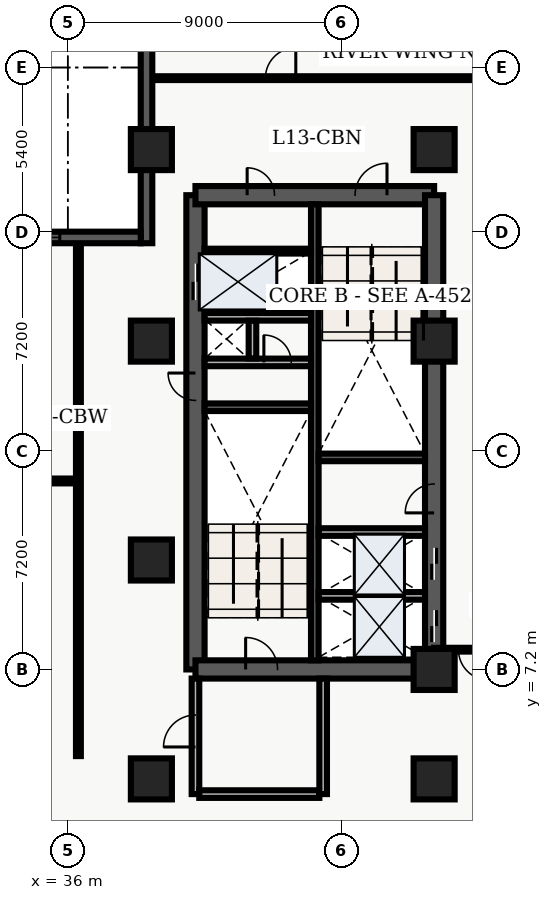
"""IFC4 building model, lengths in metres.
Left out: names, types, materials, properties, quantities, classifications, styles, units other than length and angle.
Written with IfcOpenShell. Run it as: python <this file> out.ifc"""

import sys

from ifc_helpers import new_model, entity, si_unit, converted_unit, direction, frame, origin_with_axes, origin_2d_with_axis, place, context, subcontext, project, spatial, polyline, rectangle, outline, extrude, element, fill, save


model = new_model("IFC4")
c1 = context("Model", 3, precision=1e-05, world=origin_with_axes(), true_north=direction((0.0, 1.0)))
c2 = subcontext(c1, "Body", "Model", "MODEL_VIEW")
j1 = project(units=[si_unit("LENGTHUNIT", "METRE"), converted_unit("PLANEANGLEUNIT", "DEGREE", entity("IfcPlaneAngleMeasure", 0.017), si_unit("PLANEANGLEUNIT", "RADIAN"), dimensions=[0, 0, 0, 0, 0, 0, 0])], contexts=[c1])
p1 = place(None, origin_with_axes())
s1 = spatial("IfcSite", under=j1, at=p1, CompositionType="ELEMENT")
p2 = place(p1, origin_with_axes())
s2 = spatial("IfcBuilding", under=s1, at=p2, CompositionType="ELEMENT")
p3 = place(p2, frame((0.0, 0.0, 56.1), z_axis=(0.0, 0.0, 1.0), x_axis=(1.0, 0.0, 0.0)))
s3 = spatial("IfcBuildingStorey", under=s2, at=p3, CompositionType="ELEMENT", Elevation=56.1)
p4 = place(p3, frame((40.2, 7.2, 0.0), z_axis=(0.0, 0.0, 1.0), x_axis=(0.0, 1.0, 0.0)))
e1 = element("IfcWall", 1, at=p4, inside=s3, PredefinedType="SHEAR", context=c2, shape_type="SweptSolid", body=[
    extrude(outline(polyline([(0.0, -0.3), (15.6, -0.3), (15.6, 0.3), (0.0, 0.3), (0.0, -0.3)])), origin_with_axes(), (0.0, 0.0, 1.0), 3.66),
])
p5 = place(p4, frame((12.75, 0.0, 0.0), z_axis=(0.0, 0.0, 1.0), x_axis=(1.0, 0.0, 0.0)))
e2 = element("IfcOpeningElement", 2, at=p5, cuts=e1, PredefinedType="OPENING", context=c2, shape_type="SweptSolid", body=[
    extrude(rectangle(XDim=1.2, YDim=0.62, at=origin_2d_with_axis()), origin_with_axes(), (0.0, 0.0, 1.0), 2.15),
])
p6 = place(p4, frame((9.3, 0.0, 0.0), z_axis=(0.0, 0.0, 1.0), x_axis=(1.0, 0.0, 0.0)))
e3 = element("IfcOpeningElement", 3, at=p6, cuts=e1, PredefinedType="OPENING", context=c2, shape_type="SweptSolid", body=[
    extrude(rectangle(XDim=0.9, YDim=0.62, at=origin_2d_with_axis()), origin_with_axes(), (0.0, 0.0, 1.0), 2.15),
])
p7 = place(p3, frame((40.2, 7.2, 0.0), z_axis=(0.0, 0.0, 1.0), x_axis=(1.0, 0.0, 0.0)))
e4 = element("IfcWall", 4, at=p7, inside=s3, PredefinedType="SHEAR", context=c2, shape_type="SweptSolid", body=[
    extrude(outline(polyline([(0.0, -0.3), (7.85, -0.3), (7.85, 0.3), (0.0, 0.3), (0.0, -0.3)])), origin_with_axes(), (0.0, 0.0, 1.0), 3.66),
])
p8 = place(p7, frame((2.175, 0.0, 0.0), z_axis=(0.0, 0.0, 1.0), x_axis=(1.0, 0.0, 0.0)))
e5 = element("IfcOpeningElement", 5, at=p8, cuts=e4, PredefinedType="OPENING", context=c2, shape_type="SweptSolid", body=[
    extrude(rectangle(XDim=1.05, YDim=0.62, at=origin_2d_with_axis()), origin_with_axes(), (0.0, 0.0, 1.0), 2.15),
])
p9 = place(p3, frame((40.2, 22.8, 0.0), z_axis=(0.0, 0.0, 1.0), x_axis=(1.0, 0.0, 0.0)))
e6 = element("IfcWall", 6, at=p9, inside=s3, PredefinedType="SHEAR", context=c2, shape_type="SweptSolid", body=[
    extrude(outline(polyline([(0.0, -0.3), (7.85, -0.3), (7.85, 0.3), (0.0, 0.3), (0.0, -0.3)])), origin_with_axes(), (0.0, 0.0, 1.0), 3.66),
])
p10 = place(p9, frame((5.775, 0.0, 0.0), z_axis=(0.0, 0.0, 1.0), x_axis=(1.0, 0.0, 0.0)))
e7 = element("IfcOpeningElement", 7, at=p10, cuts=e6, PredefinedType="OPENING", context=c2, shape_type="SweptSolid", body=[
    extrude(rectangle(XDim=1.05, YDim=0.62, at=origin_2d_with_axis()), origin_with_axes(), (0.0, 0.0, 1.0), 2.15),
])
p11 = place(p9, frame((2.15, 0.0, 0.0), z_axis=(0.0, 0.0, 1.0), x_axis=(1.0, 0.0, 0.0)))
e8 = element("IfcOpeningElement", 8, at=p11, cuts=e6, PredefinedType="OPENING", context=c2, shape_type="SweptSolid", body=[
    extrude(rectangle(XDim=0.9, YDim=0.62, at=origin_2d_with_axis()), origin_with_axes(), (0.0, 0.0, 1.0), 2.15),
])
p12 = place(p3, frame((48.05, 7.2, 0.0), z_axis=(0.0, 0.0, 1.0), x_axis=(0.0, 1.0, 0.0)))
e9 = element("IfcWall", 9, at=p12, inside=s3, PredefinedType="SHEAR", context=c2, shape_type="SweptSolid", body=[
    extrude(outline(polyline([(0.0, -0.3), (15.6, -0.3), (15.6, 0.3), (0.0, 0.3), (0.0, -0.3)])), origin_with_axes(), (0.0, 0.0, 1.0), 3.66),
])
p13 = place(p12, frame((1.425, 0.0, 0.0), z_axis=(0.0, 0.0, 1.0), x_axis=(1.0, 0.0, 0.0)))
e10 = element("IfcOpeningElement", 10, at=p13, cuts=e9, PredefinedType="OPENING", context=c2, shape_type="SweptSolid", body=[
    extrude(rectangle(XDim=1.05, YDim=0.62, at=origin_2d_with_axis()), origin_with_axes(), (0.0, 0.0, 1.0), 2.15),
])
p14 = place(p12, frame((3.475, 0.0, 0.0), z_axis=(0.0, 0.0, 1.0), x_axis=(1.0, 0.0, 0.0)))
e11 = element("IfcOpeningElement", 11, at=p14, cuts=e9, PredefinedType="OPENING", context=c2, shape_type="SweptSolid", body=[
    extrude(rectangle(XDim=1.05, YDim=0.62, at=origin_2d_with_axis()), origin_with_axes(), (0.0, 0.0, 1.0), 2.15),
])
p15 = place(p12, frame((5.625, 0.0, 0.0), z_axis=(0.0, 0.0, 1.0), x_axis=(1.0, 0.0, 0.0)))
e12 = element("IfcOpeningElement", 12, at=p15, cuts=e9, PredefinedType="OPENING", context=c2, shape_type="SweptSolid", body=[
    extrude(rectangle(XDim=0.95, YDim=0.62, at=origin_2d_with_axis()), origin_with_axes(), (0.0, 0.0, 1.0), 2.15),
])
p16 = place(p3, frame((44.125, 7.5, 0.0), z_axis=(0.0, 0.0, 1.0), x_axis=(0.0, 1.0, 0.0)))
e13 = element("IfcWall", 13, at=p16, inside=s3, PredefinedType="SHEAR", context=c2, shape_type="SweptSolid", body=[
    extrude(outline(polyline([(0.0, -0.125), (15.0, -0.125), (15.0, 0.125), (0.0, 0.125), (0.0, -0.125)])), origin_with_axes(), (0.0, 0.0, 1.0), 3.66),
])
for number, where, z_axis, x_axis in (
    (14, (40.5, 15.825, 0.0), (0.0, 0.0, 1.0), (1.0, 0.0, 0.0)),
    (15, (44.25, 14.175, 0.0), (0.0, 0.0, 1.0), (1.0, 0.0, 0.0)),
):
    element("IfcWall", number, at=place(p3, frame(where, z_axis=z_axis, x_axis=x_axis)), inside=s3, PredefinedType="SHEAR", context=c2, shape_type="SweptSolid", body=[
        extrude(outline(polyline([(0.0, -0.125), (3.5, -0.125), (3.5, 0.125), (0.0, 0.125), (0.0, -0.125)])), origin_with_axes(), (0.0, 0.0, 1.0), 3.66),
    ])
p17 = place(p3, frame((40.5, 17.3, 0.0), z_axis=(0.0, 0.0, 1.0), x_axis=(1.0, 0.0, 0.0)))
e16 = element("IfcWall", 16, at=p17, inside=s3, PredefinedType="SOLIDWALL", context=c2, shape_type="SweptSolid", body=[
    extrude(outline(polyline([(0.0, -0.125), (3.5, -0.125), (3.5, 0.125), (0.0, 0.125), (0.0, -0.125)])), origin_with_axes(), (0.0, 0.0, 1.0), 2.7),
])
p18 = place(p17, frame((2.4, 0.0, 0.0), z_axis=(0.0, 0.0, 1.0), x_axis=(1.0, 0.0, 0.0)))
e17 = element("IfcOpeningElement", 17, at=p18, cuts=e16, PredefinedType="OPENING", context=c2, shape_type="SweptSolid", body=[
    extrude(rectangle(XDim=0.9, YDim=0.27, at=origin_2d_with_axis()), origin_with_axes(), (0.0, 0.0, 1.0), 2.15),
])
p19 = place(p3, frame((40.5, 18.8, 0.0), z_axis=(0.0, 0.0, 1.0), x_axis=(1.0, 0.0, 0.0)))
e18 = element("IfcWall", 18, at=p19, inside=s3, PredefinedType="SOLIDWALL", context=c2, shape_type="SweptSolid", body=[
    extrude(outline(polyline([(0.0, -0.125), (3.5, -0.125), (3.5, 0.125), (0.0, 0.125), (0.0, -0.125)])), origin_with_axes(), (0.0, 0.0, 1.0), 2.7),
])
p20 = place(p3, frame((42.075, 17.43, 0.0), z_axis=(0.0, 0.0, 1.0), x_axis=(0.0, 1.0, 0.0)))
e19 = element("IfcWall", 19, at=p20, inside=s3, PredefinedType="SOLIDWALL", context=c2, shape_type="SweptSolid", body=[
    extrude(outline(polyline([(0.0, -0.125), (1.24, -0.125), (1.24, 0.125), (0.0, 0.125), (0.0, -0.125)])), origin_with_axes(), (0.0, 0.0, 1.0), 2.7),
])
p21 = place(p3, frame((40.2, 3.1, 0.0), z_axis=(0.0, 0.0, 1.0), x_axis=(0.0, 1.0, 0.0)))
e20 = element("IfcWall", 20, at=p21, inside=s3, PredefinedType="SOLIDWALL", context=c2, shape_type="SweptSolid", body=[
    extrude(outline(polyline([(0.0, -0.125), (3.8, -0.125), (3.8, 0.125), (0.0, 0.125), (0.0, -0.125)])), origin_with_axes(), (0.0, 0.0, 1.0), 2.7),
])
p22 = place(p21, frame((2.075, 0.0, 0.0), z_axis=(0.0, 0.0, 1.0), x_axis=(1.0, 0.0, 0.0)))
e21 = element("IfcOpeningElement", 21, at=p22, cuts=e20, PredefinedType="OPENING", context=c2, shape_type="SweptSolid", body=[
    extrude(rectangle(XDim=1.05, YDim=0.27, at=origin_2d_with_axis()), origin_with_axes(), (0.0, 0.0, 1.0), 2.15),
])
p23 = place(p3, frame((40.325, 3.1, 0.0), z_axis=(0.0, 0.0, 1.0), x_axis=(1.0, 0.0, 0.0)))
e22 = element("IfcWall", 22, at=p23, inside=s3, PredefinedType="SOLIDWALL", context=c2, shape_type="SweptSolid", body=[
    extrude(outline(polyline([(0.0, -0.125), (3.95, -0.125), (3.95, 0.125), (0.0, 0.125), (0.0, -0.125)])), origin_with_axes(), (0.0, 0.0, 1.0), 2.7),
])
p24 = place(p3, frame((44.4, 3.1, 0.0), z_axis=(0.0, 0.0, 1.0), x_axis=(0.0, 1.0, 0.0)))
e23 = element("IfcWall", 23, at=p24, inside=s3, PredefinedType="SOLIDWALL", context=c2, shape_type="SweptSolid", body=[
    extrude(outline(polyline([(0.0, -0.125), (3.8, -0.125), (3.8, 0.125), (0.0, 0.125), (0.0, -0.125)])), origin_with_axes(), (0.0, 0.0, 1.0), 2.7),
])
for number, where, z_axis, x_axis in (
    (24, (38.75, 3.6, 0.0), (0.0, 0.0, 1.0), (1.0, 0.0, 0.0)),
    (25, (38.75, 10.8, 0.0), (0.0, 0.0, 1.0), (1.0, 0.0, 0.0)),
    (26, (38.75, 18.0, 0.0), (0.0, 0.0, 1.0), (1.0, 0.0, 0.0)),
    (27, (38.75, 24.3, 0.0), (0.0, 0.0, 1.0), (1.0, 0.0, 0.0)),
    (28, (48.05, 3.6, 0.0), (0.0, 0.0, 1.0), (1.0, 0.0, 0.0)),
    (29, (48.05, 7.2, 0.0), (0.0, 0.0, 1.0), (1.0, 0.0, 0.0)),
    (30, (48.05, 18.0, 0.0), (0.0, 0.0, 1.0), (1.0, 0.0, 0.0)),
    (31, (48.05, 24.3, 0.0), (0.0, 0.0, 1.0), (1.0, 0.0, 0.0)),
):
    element("IfcColumn", number, at=place(p3, frame(where, z_axis=z_axis, x_axis=x_axis)), inside=s3, PredefinedType="COLUMN", context=c2, shape_type="SweptSolid", body=[
        extrude(rectangle(XDim=1.35, YDim=1.35, at=origin_2d_with_axis()), origin_with_axes(), (0.0, 0.0, 1.0), 3.9),
    ])
p25 = place(p3, frame((40.5, 20.96, 0.0), z_axis=(0.0, 0.0, 1.0), x_axis=(1.0, 0.0, 0.0)))
e32 = element("IfcWall", 32, at=p25, inside=s3, PredefinedType="PARTITIONING", context=c2, shape_type="SweptSolid", body=[
    extrude(outline(polyline([(0.0, -0.08), (3.5, -0.08), (3.5, 0.08), (0.0, 0.08), (0.0, -0.08)])), origin_with_axes(), (0.0, 0.0, 1.0), 2.7),
])
for number, where, z_axis, x_axis in (
    (33, (44.25, 9.62, 0.0), (0.0, 0.0, 1.0), (1.0, 0.0, 0.0)),
    (34, (44.25, 11.72, 0.0), (0.0, 0.0, 1.0), (1.0, 0.0, 0.0)),
):
    element("IfcWall", number, at=place(p3, frame(where, z_axis=z_axis, x_axis=x_axis)), inside=s3, PredefinedType="SOLIDWALL", context=c2, shape_type="SweptSolid", body=[
        extrude(outline(polyline([(0.0, -0.125), (3.5, -0.125), (3.5, 0.125), (0.0, 0.125), (0.0, -0.125)])), origin_with_axes(), (0.0, 0.0, 1.0), 2.7),
    ])
p26 = place(p3, frame((21.15, 13.4, 0.0), z_axis=(0.0, 0.0, 1.0), x_axis=(1.0, 0.0, 0.0)))
e35 = element("IfcWall", 35, at=p26, inside=s3, PredefinedType="PARTITIONING", context=c2, shape_type="SweptSolid", body=[
    extrude(outline(polyline([(0.0, -0.08), (15.2, -0.08), (15.2, 0.08), (0.0, 0.08), (0.0, -0.08)])), origin_with_axes(), (0.0, 0.0, 1.0), 2.7),
])
p27 = place(p26, frame((2.284, 0.0, 0.0), z_axis=(0.0, 0.0, 1.0), x_axis=(1.0, 0.0, 0.0)))
e36 = element("IfcOpeningElement", 36, at=p27, cuts=e35, PredefinedType="OPENING", context=c2, shape_type="SweptSolid", body=[
    extrude(rectangle(XDim=1.0, YDim=0.18, at=origin_2d_with_axis()), origin_with_axes(), (0.0, 0.0, 1.0), 2.15),
])
p28 = place(p26, frame((6.853, 0.0, 0.0), z_axis=(0.0, 0.0, 1.0), x_axis=(1.0, 0.0, 0.0)))
e37 = element("IfcOpeningElement", 37, at=p28, cuts=e35, PredefinedType="OPENING", context=c2, shape_type="SweptSolid", body=[
    extrude(rectangle(XDim=1.2, YDim=0.18, at=origin_2d_with_axis()), origin_with_axes(), (0.0, 0.0, 1.0), 2.2),
])
p29 = place(p26, frame((12.219, 0.0, 0.0), z_axis=(0.0, 0.0, 1.0), x_axis=(1.0, 0.0, 0.0)))
e38 = element("IfcOpeningElement", 38, at=p29, cuts=e35, PredefinedType="OPENING", context=c2, shape_type="SweptSolid", body=[
    extrude(rectangle(XDim=1.0, YDim=0.18, at=origin_2d_with_axis()), origin_with_axes(), (0.0, 0.0, 1.0), 2.15),
])
p30 = place(p3, frame((21.15, 15.7, 0.0), z_axis=(0.0, 0.0, 1.0), x_axis=(1.0, 0.0, 0.0)))
e39 = element("IfcWall", 39, at=p30, inside=s3, PredefinedType="PARTITIONING", context=c2, shape_type="SweptSolid", body=[
    extrude(outline(polyline([(0.0, -0.08), (15.2, -0.08), (15.2, 0.08), (0.0, 0.08), (0.0, -0.08)])), origin_with_axes(), (0.0, 0.0, 1.0), 2.7),
])
p31 = place(p30, frame((3.583, 0.0, 0.0), z_axis=(0.0, 0.0, 1.0), x_axis=(1.0, 0.0, 0.0)))
e40 = element("IfcOpeningElement", 40, at=p31, cuts=e39, PredefinedType="OPENING", context=c2, shape_type="SweptSolid", body=[
    extrude(rectangle(XDim=1.0, YDim=0.18, at=origin_2d_with_axis()), origin_with_axes(), (0.0, 0.0, 1.0), 2.15),
])
p32 = place(p30, frame((11.053, 0.0, 0.0), z_axis=(0.0, 0.0, 1.0), x_axis=(1.0, 0.0, 0.0)))
e41 = element("IfcOpeningElement", 41, at=p32, cuts=e39, PredefinedType="OPENING", context=c2, shape_type="SweptSolid", body=[
    extrude(rectangle(XDim=1.0, YDim=0.18, at=origin_2d_with_axis()), origin_with_axes(), (0.0, 0.0, 1.0), 2.15),
])
p33 = place(p3, frame((36.35, 4.35, 0.0), z_axis=(0.0, 0.0, 1.0), x_axis=(0.0, 1.0, 0.0)))
e42 = element("IfcWall", 42, at=p33, inside=s3, PredefinedType="PARTITIONING", context=c2, shape_type="SweptSolid", body=[
    extrude(outline(polyline([(0.0, -0.08), (16.95, -0.08), (16.95, 0.08), (0.0, 0.08), (0.0, -0.08)])), origin_with_axes(), (0.0, 0.0, 1.0), 2.7),
])
p34 = place(p3, frame((59.64, 7.85, 0.0), z_axis=(0.0, 0.0, 1.0), x_axis=(-1.0, 0.0, 0.0)))
e43 = element("IfcWall", 43, at=p34, inside=s3, PredefinedType="PARTITIONING", context=c2, shape_type="SweptSolid", body=[
    extrude(outline(polyline([(0.0, -0.062), (11.59, -0.062), (11.59, 0.062), (0.0, 0.062), (0.0, -0.062)])), origin_with_axes(), (0.0, 0.0, 1.0), 2.7),
])
p35 = place(p34, frame((10.29, 0.0, 0.0), z_axis=(0.0, 0.0, 1.0), x_axis=(1.0, 0.0, 0.0)))
e44 = element("IfcOpeningElement", 44, at=p35, cuts=e43, PredefinedType="OPENING", context=c2, shape_type="SweptSolid", body=[
    extrude(rectangle(XDim=1.0, YDim=0.145, at=origin_2d_with_axis()), origin_with_axes(), (0.0, 0.0, 1.0), 2.15),
])
p36 = place(p3, frame((38.76, 26.65, 0.0), z_axis=(0.0, 0.0, 1.0), x_axis=(1.0, 0.0, 0.0)))
e45 = element("IfcWall", 45, at=p36, inside=s3, PredefinedType="PARTITIONING", context=c2, shape_type="SweptSolid", body=[
    extrude(outline(polyline([(0.0, -0.062), (20.88, -0.062), (20.88, 0.062), (0.0, 0.062), (0.0, -0.062)])), origin_with_axes(), (0.0, 0.0, 1.0), 2.7),
])
p37 = place(p36, frame((4.24, 0.0, 0.0), z_axis=(0.0, 0.0, 1.0), x_axis=(1.0, 0.0, 0.0)))
e46 = element("IfcOpeningElement", 46, at=p37, cuts=e45, PredefinedType="OPENING", context=c2, shape_type="SweptSolid", body=[
    extrude(rectangle(XDim=1.0, YDim=0.145, at=origin_2d_with_axis()), origin_with_axes(), (0.0, 0.0, 1.0), 2.15),
])
p38 = place(p3, frame((38.59, 21.22, 0.0), z_axis=(0.0, 0.0, 1.0), x_axis=(0.0, 1.0, 0.0)))
e47 = element("IfcWall", 47, at=p38, inside=s3, PredefinedType="SOLIDWALL", context=c2, shape_type="SweptSolid", body=[
    extrude(outline(polyline([(0.0, -0.19), (7.58, -0.19), (7.58, 0.19), (0.0, 0.19), (0.0, -0.19)])), origin_with_axes(), (0.0, 0.0, 1.0), 3.66),
])
p39 = place(p3, frame((21.22, 21.41, 0.0), z_axis=(0.0, 0.0, 1.0), x_axis=(1.0, 0.0, 0.0)))
e48 = element("IfcWall", 48, at=p39, inside=s3, PredefinedType="SOLIDWALL", context=c2, shape_type="SweptSolid", body=[
    extrude(outline(polyline([(0.0, -0.19), (17.18, -0.19), (17.18, 0.19), (0.0, 0.19), (0.0, -0.19)])), origin_with_axes(), (0.0, 0.0, 1.0), 3.66),
])
p40 = place(p39, frame((3.263, 0.0, 0.45), z_axis=(0.0, 0.0, 1.0), x_axis=(1.0, 0.0, 0.0)))
e49 = element("IfcOpeningElement", 49, at=p40, cuts=e48, PredefinedType="OPENING", context=c2, shape_type="SweptSolid", body=[
    extrude(rectangle(XDim=2.1, YDim=0.4, at=origin_2d_with_axis()), origin_with_axes(), (0.0, 0.0, 1.0), 2.2),
])
p41 = place(p39, frame((8.59, 0.0, 0.45), z_axis=(0.0, 0.0, 1.0), x_axis=(1.0, 0.0, 0.0)))
e50 = element("IfcOpeningElement", 50, at=p41, cuts=e48, PredefinedType="OPENING", context=c2, shape_type="SweptSolid", body=[
    extrude(rectangle(XDim=2.1, YDim=0.4, at=origin_2d_with_axis()), origin_with_axes(), (0.0, 0.0, 1.0), 2.2),
])
p42 = place(p39, frame((13.467, 0.0, 0.45), z_axis=(0.0, 0.0, 1.0), x_axis=(1.0, 0.0, 0.0)))
e51 = element("IfcOpeningElement", 51, at=p42, cuts=e48, PredefinedType="OPENING", context=c2, shape_type="SweptSolid", body=[
    extrude(rectangle(XDim=2.1, YDim=0.4, at=origin_2d_with_axis()), origin_with_axes(), (0.0, 0.0, 1.0), 2.2),
])
p43 = place(p12, frame((1.425, 0.0, 0.0), z_axis=(0.0, 0.0, 1.0), x_axis=(1.0, 0.0, 0.0)))
e52 = element("IfcDoor", 52, at=p43, inside=s3, OperationType="SLIDING_TO_LEFT", PredefinedType="DOOR", context=c2, shape_type="SweptSolid", body=[
    extrude(rectangle(XDim=1.05, YDim=0.09, at=origin_2d_with_axis()), origin_with_axes(), (0.0, 0.0, 1.0), 2.15),
])
fill(e10, e52)
p44 = place(p12, frame((3.475, 0.0, 0.0), z_axis=(0.0, 0.0, 1.0), x_axis=(1.0, 0.0, 0.0)))
e53 = element("IfcDoor", 53, at=p44, inside=s3, OperationType="SLIDING_TO_RIGHT", PredefinedType="DOOR", context=c2, shape_type="SweptSolid", body=[
    extrude(rectangle(XDim=1.05, YDim=0.09, at=origin_2d_with_axis()), origin_with_axes(), (0.0, 0.0, 1.0), 2.15),
])
fill(e11, e53)
p45 = place(p4, frame((12.75, 0.0, 0.0), z_axis=(0.0, 0.0, 1.0), x_axis=(1.0, 0.0, 0.0)))
e54 = element("IfcDoor", 54, at=p45, inside=s3, OperationType="DOUBLE_DOOR_SLIDING", PredefinedType="DOOR", context=c2, shape_type="SweptSolid", body=[
    extrude(rectangle(XDim=1.2, YDim=0.09, at=origin_2d_with_axis()), origin_with_axes(), (0.0, 0.0, 1.0), 2.15),
])
fill(e2, e54)
p46 = place(p4, frame((9.3, 0.0, 0.0), z_axis=(0.0, 0.0, 1.0), x_axis=(1.0, 0.0, 0.0)))
e55 = element("IfcDoor", 55, at=p46, inside=s3, OperationType="SINGLE_SWING_RIGHT", PredefinedType="DOOR", context=c2, shape_type="SweptSolid", body=[
    extrude(rectangle(XDim=0.9, YDim=0.09, at=origin_2d_with_axis()), origin_with_axes(), (0.0, 0.0, 1.0), 2.15),
])
fill(e3, e55)
p47 = place(p17, frame((2.4, 0.0, 0.0), z_axis=(0.0, 0.0, 1.0), x_axis=(1.0, 0.0, 0.0)))
e56 = element("IfcDoor", 56, at=p47, inside=s3, OperationType="SINGLE_SWING_LEFT", PredefinedType="DOOR", context=c2, shape_type="SweptSolid", body=[
    extrude(rectangle(XDim=0.9, YDim=0.09, at=origin_2d_with_axis()), origin_with_axes(), (0.0, 0.0, 1.0), 2.15),
])
fill(e17, e56)
p48 = place(p7, frame((2.175, 0.0, 0.0), z_axis=(0.0, 0.0, 1.0), x_axis=(1.0, 0.0, 0.0)))
e57 = element("IfcDoor", 57, at=p48, inside=s3, OperationType="SINGLE_SWING_LEFT", PredefinedType="DOOR", context=c2, shape_type="SweptSolid", body=[
    extrude(rectangle(XDim=1.05, YDim=0.09, at=origin_2d_with_axis()), origin_with_axes(), (0.0, 0.0, 1.0), 2.15),
])
fill(e5, e57)
p49 = place(p9, frame((5.775, 0.0, 0.0), z_axis=(0.0, 0.0, 1.0), x_axis=(1.0, 0.0, 0.0)))
e58 = element("IfcDoor", 58, at=p49, inside=s3, OperationType="SINGLE_SWING_RIGHT", PredefinedType="DOOR", context=c2, shape_type="SweptSolid", body=[
    extrude(rectangle(XDim=1.05, YDim=0.09, at=origin_2d_with_axis()), origin_with_axes(), (0.0, 0.0, 1.0), 2.15),
])
fill(e7, e58)
p50 = place(p21, frame((2.075, 0.0, 0.0), z_axis=(0.0, 0.0, 1.0), x_axis=(1.0, 0.0, 0.0)))
e59 = element("IfcDoor", 59, at=p50, inside=s3, OperationType="SINGLE_SWING_LEFT", PredefinedType="DOOR", context=c2, shape_type="SweptSolid", body=[
    extrude(rectangle(XDim=1.05, YDim=0.09, at=origin_2d_with_axis()), origin_with_axes(), (0.0, 0.0, 1.0), 2.15),
])
fill(e21, e59)
p51 = place(p9, frame((2.15, 0.0, 0.0), z_axis=(0.0, 0.0, 1.0), x_axis=(1.0, 0.0, 0.0)))
e60 = element("IfcDoor", 60, at=p51, inside=s3, OperationType="SINGLE_SWING_LEFT", PredefinedType="DOOR", context=c2, shape_type="SweptSolid", body=[
    extrude(rectangle(XDim=0.9, YDim=0.09, at=origin_2d_with_axis()), origin_with_axes(), (0.0, 0.0, 1.0), 2.15),
])
fill(e8, e60)
p52 = place(p12, frame((5.625, 0.0, 0.0), z_axis=(0.0, 0.0, 1.0), x_axis=(1.0, 0.0, 0.0)))
e61 = element("IfcDoor", 61, at=p52, inside=s3, OperationType="SINGLE_SWING_LEFT", PredefinedType="DOOR", context=c2, shape_type="SweptSolid", body=[
    extrude(rectangle(XDim=0.95, YDim=0.09, at=origin_2d_with_axis()), origin_with_axes(), (0.0, 0.0, 1.0), 2.15),
])
fill(e12, e61)
p53 = place(p34, frame((10.29, 0.0, 0.0), z_axis=(0.0, 0.0, 1.0), x_axis=(1.0, 0.0, 0.0)))
e62 = element("IfcDoor", 62, at=p53, inside=s3, OperationType="SINGLE_SWING_LEFT", PredefinedType="DOOR", context=c2, shape_type="SweptSolid", body=[
    extrude(rectangle(XDim=1.0, YDim=0.075, at=origin_2d_with_axis()), origin_with_axes(), (0.0, 0.0, 1.0), 2.15),
])
fill(e44, e62)
p54 = place(p36, frame((4.24, 0.0, 0.0), z_axis=(0.0, 0.0, 1.0), x_axis=(1.0, 0.0, 0.0)))
e63 = element("IfcDoor", 63, at=p54, inside=s3, OperationType="SINGLE_SWING_RIGHT", PredefinedType="DOOR", context=c2, shape_type="SweptSolid", body=[
    extrude(rectangle(XDim=1.0, YDim=0.075, at=origin_2d_with_axis()), origin_with_axes(), (0.0, 0.0, 1.0), 2.15),
])
fill(e46, e63)
p55 = place(p39, frame((13.467, 0.0, 0.45), z_axis=(0.0, 0.0, 1.0), x_axis=(1.0, 0.0, 0.0)))
e64 = element("IfcWindow", 64, at=p55, inside=s3, PredefinedType="WINDOW", context=c2, shape_type="SweptSolid", body=[
    extrude(rectangle(XDim=2.1, YDim=0.09, at=origin_2d_with_axis()), origin_with_axes(), (0.0, 0.0, 1.0), 2.2),
])
fill(e51, e64)
save(model, sys.argv[1])
